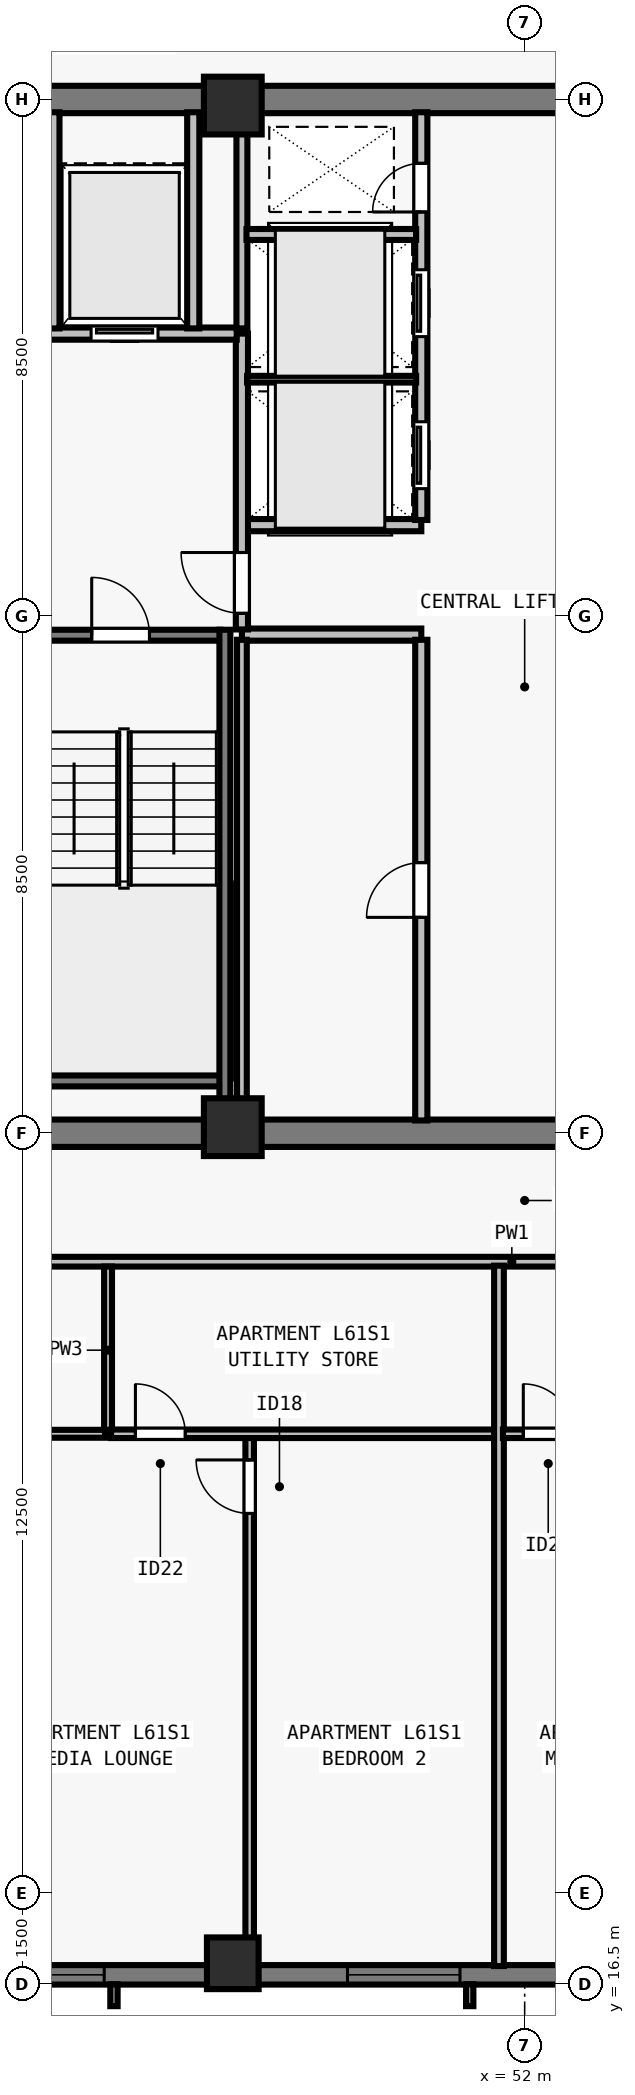
"""IFC4 building model, lengths in metres.
Left out: names, types, materials, properties, quantities, classifications, styles, units other than length and angle.
Written with IfcOpenShell. Run it as: python <this file> out.ifc"""

import sys

from ifc_helpers import new_model, si_unit, direction, frame, frame_2d, origin, origin_2d, place, context, subcontext, project, spatial, rectangle, extrude, element, fill, save


model = new_model("IFC4")
c1 = context("Model", 3, precision=1e-05, world=origin(), true_north=direction((0.0, 1.0)))
c2 = subcontext(c1, "Body", "Model", "MODEL_VIEW")
j1 = project(units=[si_unit("LENGTHUNIT", "METRE"), si_unit("PLANEANGLEUNIT", "RADIAN")], contexts=[c1])
p1 = place(None, origin())
s1 = spatial("IfcSite", under=j1, at=p1, CompositionType="ELEMENT")
p2 = place(p1, origin())
s2 = spatial("IfcBuilding", under=s1, at=p2, CompositionType="ELEMENT")
p3 = place(p2, frame((0.0, 0.0, 223.5)))
s3 = spatial("IfcBuildingStorey", under=s2, at=p3, CompositionType="ELEMENT", Elevation=223.5)
for number, where, z_axis, x_axis in (
    (1, (47.2, 30.6, 0.0), (0.0, 0.0, 1.0), (1.0, 0.0, 0.0)),
    (2, (47.2, 47.4, 0.0), (0.0, 0.0, 1.0), (1.0, 0.0, 0.0)),
):
    element("IfcColumn", number, at=place(p3, frame(where, z_axis=z_axis, x_axis=x_axis)), inside=s3, PredefinedType="COLUMN", context=c2, shape_type="SweptSolid", body=[
        extrude(rectangle(XDim=0.95, YDim=0.95, at=origin_2d()), origin(), (0.0, 0.0, 1.0), 3.5),
    ])
p4 = place(p3, frame((47.2, 16.85, 0.0), z_axis=(0.0, 0.0, 1.0), x_axis=(1.0, 0.0, 0.0)))
e3 = element("IfcColumn", 3, at=p4, inside=s3, PredefinedType="COLUMN", context=c2, shape_type="SweptSolid", body=[
    extrude(rectangle(XDim=0.85, YDim=0.85, at=origin_2d()), origin(), (0.0, 0.0, 1.0), 3.5),
])
p5 = place(p3, frame((69.5, 16.66, 0.0), z_axis=(0.0, 0.0, 1.0), x_axis=(-1.0, 0.0, 0.0)))
e4 = element("IfcWall", 4, at=p5, inside=s3, PredefinedType="SOLIDWALL", context=c2, shape_type="SweptSolid", body=[
    extrude(rectangle(XDim=34.702, YDim=0.32, at=frame_2d((17.351, 0.0))), origin(), (0.0, 0.0, 1.0), 3.29),
])
p6 = place(p5, frame((5.863, 0.0, 0.8)))
e5 = element("IfcOpeningElement", 5, at=p6, cuts=e4, PredefinedType="OPENING", context=c2, shape_type="SweptSolid", body=[
    extrude(rectangle(XDim=1.85, YDim=1.678, at=frame_2d((0.925, 0.839))), frame((0.0, 0.17, 0.0), z_axis=(0.0, -1.0, 0.0), x_axis=(1.0, 0.0, 0.0)), (0.0, 0.0, 1.0), 0.34),
])
p7 = place(p5, frame((8.138, 0.0, 0.8)))
e6 = element("IfcOpeningElement", 6, at=p7, cuts=e4, PredefinedType="OPENING", context=c2, shape_type="SweptSolid", body=[
    extrude(rectangle(XDim=1.55, YDim=1.678, at=frame_2d((0.775, 0.839))), frame((0.0, 0.17, 0.0), z_axis=(0.0, -1.0, 0.0), x_axis=(1.0, 0.0, 0.0)), (0.0, 0.0, 1.0), 0.34),
])
p8 = place(p5, frame((10.113, 0.0, 0.8)))
e7 = element("IfcOpeningElement", 7, at=p8, cuts=e4, PredefinedType="OPENING", context=c2, shape_type="SweptSolid", body=[
    extrude(rectangle(XDim=1.85, YDim=1.678, at=frame_2d((0.925, 0.839))), frame((0.0, 0.17, 0.0), z_axis=(0.0, -1.0, 0.0), x_axis=(1.0, 0.0, 0.0)), (0.0, 0.0, 1.0), 0.34),
])
p9 = place(p5, frame((14.888, 0.0, 0.8)))
e8 = element("IfcOpeningElement", 8, at=p9, cuts=e4, PredefinedType="OPENING", context=c2, shape_type="SweptSolid", body=[
    extrude(rectangle(XDim=1.55, YDim=1.678, at=frame_2d((0.775, 0.839))), frame((0.0, 0.17, 0.0), z_axis=(0.0, -1.0, 0.0), x_axis=(1.0, 0.0, 0.0)), (0.0, 0.0, 1.0), 0.34),
])
p10 = place(p5, frame((18.564, 0.0, 0.8)))
e9 = element("IfcOpeningElement", 9, at=p10, cuts=e4, PredefinedType="OPENING", context=c2, shape_type="SweptSolid", body=[
    extrude(rectangle(XDim=1.85, YDim=1.678, at=frame_2d((0.925, 0.839))), frame((0.0, 0.17, 0.0), z_axis=(0.0, -1.0, 0.0), x_axis=(1.0, 0.0, 0.0)), (0.0, 0.0, 1.0), 0.34),
])
p11 = place(p5, frame((24.414, 0.0, 0.8)))
e10 = element("IfcOpeningElement", 10, at=p11, cuts=e4, PredefinedType="OPENING", context=c2, shape_type="SweptSolid", body=[
    extrude(rectangle(XDim=1.85, YDim=1.678, at=frame_2d((0.925, 0.839))), frame((0.0, 0.17, 0.0), z_axis=(0.0, -1.0, 0.0), x_axis=(1.0, 0.0, 0.0)), (0.0, 0.0, 1.0), 0.34),
])
p12 = place(p5, frame((28.389, 0.0, 0.8)))
e11 = element("IfcOpeningElement", 11, at=p12, cuts=e4, PredefinedType="OPENING", context=c2, shape_type="SweptSolid", body=[
    extrude(rectangle(XDim=1.55, YDim=1.678, at=frame_2d((0.775, 0.839))), frame((0.0, 0.17, 0.0), z_axis=(0.0, -1.0, 0.0), x_axis=(1.0, 0.0, 0.0)), (0.0, 0.0, 1.0), 0.34),
])
for number, where, z_axis, x_axis in (
    (12, (43.275, 30.5, 0.0), (0.0, 0.0, 1.0), (1.0, 0.0, 0.0)),
    (13, (43.275, 47.5, 0.0), (0.0, 0.0, 1.0), (1.0, 0.0, 0.0)),
):
    element("IfcWall", number, at=place(p3, frame(where, z_axis=z_axis, x_axis=x_axis)), inside=s3, PredefinedType="SHEAR", context=c2, shape_type="SweptSolid", body=[
        extrude(rectangle(XDim=17.45, YDim=0.45, at=frame_2d((8.725, 0.0))), origin(), (0.0, 0.0, 1.0), 3.29),
    ])
for number, where, z_axis, x_axis in (
    (14, (47.35, 38.7, 0.0), (0.0, 0.0, 1.0), (1.0, 0.0, 0.0)),
    (15, (47.35, 40.5, 0.0), (0.0, 0.0, 1.0), (1.0, 0.0, 0.0)),
):
    element("IfcWall", number, at=place(p3, frame(where, z_axis=z_axis, x_axis=x_axis)), inside=s3, PredefinedType="SOLIDWALL", context=c2, shape_type="SweptSolid", body=[
        extrude(rectangle(XDim=2.95, YDim=0.2, at=frame_2d((1.475, 0.0))), origin(), (0.0, 0.0, 1.0), 3.29),
    ])
p13 = place(p3, frame((50.3, 30.71, 0.0), z_axis=(0.0, 0.0, 1.0), x_axis=(0.0, 1.0, 0.0)))
e16 = element("IfcWall", 16, at=p13, inside=s3, PredefinedType="SOLIDWALL", context=c2, shape_type="SweptSolid", body=[
    extrude(rectangle(XDim=7.905, YDim=0.2, at=frame_2d((3.953, 0.0))), origin(), (0.0, 0.0, 1.0), 3.29),
])
p14 = place(p13, frame((3.34, 0.0, 0.0)))
e17 = element("IfcOpeningElement", 17, at=p14, cuts=e16, PredefinedType="OPENING", context=c2, shape_type="SweptSolid", body=[
    extrude(rectangle(XDim=0.9, YDim=2.12, at=frame_2d((0.45, 1.06))), frame((0.0, 0.11, 0.0), z_axis=(0.0, -1.0, 0.0), x_axis=(1.0, 0.0, 0.0)), (0.0, 0.0, 1.0), 0.22),
])
p15 = place(p3, frame((50.3, 40.585, 0.0), z_axis=(0.0, 0.0, 1.0), x_axis=(0.0, 1.0, 0.0)))
e18 = element("IfcWall", 18, at=p15, inside=s3, PredefinedType="SOLIDWALL", context=c2, shape_type="SweptSolid", body=[
    extrude(rectangle(XDim=6.705, YDim=0.2, at=frame_2d((3.353, 0.0))), origin(), (0.0, 0.0, 1.0), 3.29),
])
p16 = place(p15, frame((0.515, 0.0, 0.0)))
e19 = element("IfcOpeningElement", 19, at=p16, cuts=e18, PredefinedType="OPENING", context=c2, shape_type="SweptSolid", body=[
    extrude(rectangle(XDim=1.1, YDim=2.2, at=frame_2d((0.55, 1.1))), frame((0.0, 0.11, 0.0), z_axis=(0.0, -1.0, 0.0), x_axis=(1.0, 0.0, 0.0)), (0.0, 0.0, 1.0), 0.22),
])
p17 = place(p15, frame((3.015, 0.0, 0.0)))
e20 = element("IfcOpeningElement", 20, at=p17, cuts=e18, PredefinedType="OPENING", context=c2, shape_type="SweptSolid", body=[
    extrude(rectangle(XDim=1.1, YDim=2.2, at=frame_2d((0.55, 1.1))), frame((0.0, 0.11, 0.0), z_axis=(0.0, -1.0, 0.0), x_axis=(1.0, 0.0, 0.0)), (0.0, 0.0, 1.0), 0.22),
])
p18 = place(p15, frame((5.065, 0.0, 0.0)))
e21 = element("IfcOpeningElement", 21, at=p18, cuts=e18, PredefinedType="OPENING", context=c2, shape_type="SweptSolid", body=[
    extrude(rectangle(XDim=0.8, YDim=2.08, at=frame_2d((0.4, 1.04))), frame((0.0, 0.11, 0.0), z_axis=(0.0, -1.0, 0.0), x_axis=(1.0, 0.0, 0.0)), (0.0, 0.0, 1.0), 0.22),
])
p19 = place(p3, frame((47.35, 38.785, 0.0), z_axis=(0.0, 0.0, 1.0), x_axis=(0.0, 1.0, 0.0)))
e22 = element("IfcWall", 22, at=p19, inside=s3, PredefinedType="SOLIDWALL", context=c2, shape_type="SweptSolid", body=[
    extrude(rectangle(XDim=4.865, YDim=0.2, at=frame_2d((2.433, 0.0))), origin(), (0.0, 0.0, 1.0), 3.29),
])
p20 = place(p19, frame((0.265, 0.0, 0.0)))
e23 = element("IfcOpeningElement", 23, at=p20, cuts=e22, PredefinedType="OPENING", context=c2, shape_type="SweptSolid", body=[
    extrude(rectangle(XDim=1.0, YDim=2.15, at=frame_2d((0.5, 1.075))), frame((0.0, 0.11, 0.0), z_axis=(0.0, -1.0, 0.0), x_axis=(1.0, 0.0, 0.0)), (0.0, 0.0, 1.0), 0.22),
])
p21 = place(p3, frame((43.71, 43.65, 0.0), z_axis=(0.0, 0.0, 1.0), x_axis=(1.0, 0.0, 0.0)))
e24 = element("IfcWall", 24, at=p21, inside=s3, PredefinedType="SOLIDWALL", context=c2, shape_type="SweptSolid", body=[
    extrude(rectangle(XDim=3.555, YDim=0.2, at=frame_2d((1.777, 0.0))), origin(), (0.0, 0.0, 1.0), 3.29),
])
p22 = place(p21, frame((1.16, 0.0, 0.0)))
e25 = element("IfcOpeningElement", 25, at=p22, cuts=e24, PredefinedType="OPENING", context=c2, shape_type="SweptSolid", body=[
    extrude(rectangle(XDim=1.1, YDim=2.2, at=frame_2d((0.55, 1.1))), frame((0.0, 0.11, 0.0), z_axis=(0.0, -1.0, 0.0), x_axis=(1.0, 0.0, 0.0)), (0.0, 0.0, 1.0), 0.22),
])
for number, where, z_axis, x_axis in (
    (26, (46.55, 43.735, 0.0), (0.0, 0.0, 1.0), (0.0, 1.0, 0.0)),
    (27, (44.25, 43.735, 0.0), (0.0, 0.0, 1.0), (0.0, 1.0, 0.0)),
):
    element("IfcWall", number, at=place(p3, frame(where, z_axis=z_axis, x_axis=x_axis)), inside=s3, PredefinedType="SOLIDWALL", context=c2, shape_type="SweptSolid", body=[
        extrude(rectangle(XDim=3.555, YDim=0.2, at=frame_2d((1.777, 0.0))), origin(), (0.0, 0.0, 1.0), 3.29),
    ])
p23 = place(p3, frame((47.35, 30.71, 0.0), z_axis=(0.0, 0.0, 1.0), x_axis=(0.0, 1.0, 0.0)))
e28 = element("IfcWall", 28, at=p23, inside=s3, PredefinedType="PARTITIONING", context=c2, shape_type="SweptSolid", body=[
    extrude(rectangle(XDim=7.905, YDim=0.16, at=frame_2d((3.953, 0.0))), origin(), (0.0, 0.0, 1.0), 3.29),
])
p24 = place(p3, frame((47.35, 43.735, 0.0), z_axis=(0.0, 0.0, 1.0), x_axis=(0.0, 1.0, 0.0)))
e29 = element("IfcWall", 29, at=p24, inside=s3, PredefinedType="SOLIDWALL", context=c2, shape_type="SweptSolid", body=[
    extrude(rectangle(XDim=3.555, YDim=0.18, at=frame_2d((1.777, 0.0))), origin(), (0.0, 0.0, 1.0), 3.29),
])
p25 = place(p3, frame((47.435, 42.9, 0.0), z_axis=(0.0, 0.0, 1.0), x_axis=(1.0, 0.0, 0.0)))
e30 = element("IfcWall", 30, at=p25, inside=s3, PredefinedType="PARTITIONING", context=c2, shape_type="SweptSolid", body=[
    extrude(rectangle(XDim=2.78, YDim=0.11, at=frame_2d((1.39, 0.0))), origin(), (0.0, 0.0, 1.0), 3.29),
])
p26 = place(p3, frame((47.425, 45.28, 0.0), z_axis=(0.0, 0.0, 1.0), x_axis=(1.0, 0.0, 0.0)))
e31 = element("IfcWall", 31, at=p26, inside=s3, PredefinedType="SOLIDWALL", context=c2, shape_type="SweptSolid", body=[
    extrude(rectangle(XDim=2.79, YDim=0.18, at=frame_2d((1.395, 0.0))), origin(), (0.0, 0.0, 1.0), 3.29),
])
p27 = place(p3, frame((29.805, 28.387, 0.0), z_axis=(0.0, 0.0, 1.0), x_axis=(1.0, 0.0, 0.0)))
e32 = element("IfcWall", 32, at=p27, inside=s3, PredefinedType="PARTITIONING", context=c2, shape_type="SweptSolid", body=[
    extrude(rectangle(XDim=44.39, YDim=0.16, at=frame_2d((22.195, 0.0))), origin(), (0.0, 0.0, 1.0), 2.958),
])
p28 = place(p27, frame((10.464, 0.0, 0.0)))
e33 = element("IfcOpeningElement", 33, at=p28, cuts=e32, PredefinedType="OPENING", context=c2, shape_type="SweptSolid", body=[
    extrude(rectangle(XDim=0.96, YDim=2.18, at=frame_2d((0.48, 1.09))), frame((0.0, 0.09, 0.0), z_axis=(0.0, -1.0, 0.0), x_axis=(1.0, 0.0, 0.0)), (0.0, 0.0, 1.0), 0.18),
])
p29 = place(p27, frame((32.544, 0.0, 0.0)))
e34 = element("IfcOpeningElement", 34, at=p29, cuts=e32, PredefinedType="OPENING", context=c2, shape_type="SweptSolid", body=[
    extrude(rectangle(XDim=0.96, YDim=2.18, at=frame_2d((0.48, 1.09))), frame((0.0, 0.09, 0.0), z_axis=(0.0, -1.0, 0.0), x_axis=(1.0, 0.0, 0.0)), (0.0, 0.0, 1.0), 0.18),
])
p30 = place(p3, frame((45.149, 25.558, 0.0), z_axis=(0.0, 0.0, 1.0), x_axis=(0.0, 1.0, 0.0)))
e35 = element("IfcWall", 35, at=p30, inside=s3, PredefinedType="PLUMBINGWALL", context=c2, shape_type="SweptSolid", body=[
    extrude(rectangle(XDim=2.75, YDim=0.13, at=frame_2d((1.375, 0.0))), origin(), (0.0, 0.0, 1.0), 3.29),
])
p31 = place(p3, frame((41.949, 25.558, 0.0), z_axis=(0.0, 0.0, 1.0), x_axis=(1.0, 0.0, 0.0)))
e36 = element("IfcWall", 36, at=p31, inside=s3, PredefinedType="PLUMBINGWALL", context=c2, shape_type="SweptSolid", body=[
    extrude(rectangle(XDim=3.15, YDim=0.13, at=frame_2d((1.575, 0.0))), origin(), (0.0, 0.0, 1.0), 3.29),
])
p32 = place(p3, frame((47.478, 16.88, 0.0), z_axis=(0.0, 0.0, 1.0), x_axis=(0.0, 1.0, 0.0)))
e37 = element("IfcWall", 37, at=p32, inside=s3, PredefinedType="PARTITIONING", context=c2, shape_type="SweptSolid", body=[
    extrude(rectangle(XDim=8.718, YDim=0.14, at=frame_2d((4.359, 0.0))), origin(), (0.0, 0.0, 1.0), 2.958),
])
p33 = place(p32, frame((7.367, 0.0, 0.0)))
e38 = element("IfcOpeningElement", 38, at=p33, cuts=e37, PredefinedType="OPENING", context=c2, shape_type="SweptSolid", body=[
    extrude(rectangle(XDim=0.88, YDim=2.1, at=frame_2d((0.44, 1.05))), frame((0.0, 0.08, 0.0), z_axis=(0.0, -1.0, 0.0), x_axis=(1.0, 0.0, 0.0)), (0.0, 0.0, 1.0), 0.16),
])
p34 = place(p3, frame((45.199, 25.558, 0.0), z_axis=(0.0, 0.0, 1.0), x_axis=(1.0, 0.0, 0.0)))
e39 = element("IfcWall", 39, at=p34, inside=s3, PredefinedType="PARTITIONING", context=c2, shape_type="SweptSolid", body=[
    extrude(rectangle(XDim=6.429, YDim=0.14, at=frame_2d((3.214, 0.0))), origin(), (0.0, 0.0, 1.0), 3.29),
])
p35 = place(p34, frame((0.4, 0.0, 0.0)))
e40 = element("IfcOpeningElement", 40, at=p35, cuts=e39, PredefinedType="OPENING", context=c2, shape_type="SweptSolid", body=[
    extrude(rectangle(XDim=0.82, YDim=2.1, at=frame_2d((0.41, 1.05))), frame((0.0, 0.08, 0.0), z_axis=(0.0, -1.0, 0.0), x_axis=(1.0, 0.0, 0.0)), (0.0, 0.0, 1.0), 0.16),
])
p36 = place(p3, frame((51.577, 16.805, 0.0), z_axis=(0.0, 0.0, 1.0), x_axis=(0.0, 1.0, 0.0)))
e41 = element("IfcWall", 41, at=p36, inside=s3, PredefinedType="PARTITIONING", context=c2, shape_type="SweptSolid", body=[
    extrude(rectangle(XDim=11.518, YDim=0.16, at=frame_2d((5.759, 0.0))), origin(), (0.0, 0.0, 1.0), 2.958),
])
p37 = place(p3, frame((51.643, 25.558, 0.0), z_axis=(0.0, 0.0, 1.0), x_axis=(1.0, 0.0, 0.0)))
e42 = element("IfcWall", 42, at=p37, inside=s3, PredefinedType="PARTITIONING", context=c2, shape_type="SweptSolid", body=[
    extrude(rectangle(XDim=7.036, YDim=0.14, at=frame_2d((3.518, 0.0))), origin(), (0.0, 0.0, 1.0), 3.29),
])
p38 = place(p37, frame((0.335, 0.0, 0.0)))
e43 = element("IfcOpeningElement", 43, at=p38, cuts=e42, PredefinedType="OPENING", context=c2, shape_type="SweptSolid", body=[
    extrude(rectangle(XDim=0.82, YDim=2.1, at=frame_2d((0.41, 1.05))), frame((0.0, 0.08, 0.0), z_axis=(0.0, -1.0, 0.0), x_axis=(1.0, 0.0, 0.0)), (0.0, 0.0, 1.0), 0.16),
])
p39 = place(p3, frame((43.715, 38.69, 0.0), z_axis=(0.0, 0.0, 1.0), x_axis=(1.0, 0.0, 0.0)))
e44 = element("IfcWall", 44, at=p39, inside=s3, PredefinedType="SOLIDWALL", context=c2, shape_type="SweptSolid", body=[
    extrude(rectangle(XDim=3.28, YDim=0.18, at=frame_2d((1.64, 0.0))), origin(), (0.0, 0.0, 1.0), 3.29),
])
p40 = place(p39, frame((1.165, 0.0, 0.0)))
e45 = element("IfcOpeningElement", 45, at=p40, cuts=e44, PredefinedType="OPENING", context=c2, shape_type="SweptSolid", body=[
    extrude(rectangle(XDim=0.95, YDim=2.15, at=frame_2d((0.475, 1.075))), frame((0.0, 0.1, 0.0), z_axis=(0.0, -1.0, 0.0), x_axis=(1.0, 0.0, 0.0)), (0.0, 0.0, 1.0), 0.2),
])
p41 = place(p3, frame((43.715, 31.36, 0.0), z_axis=(0.0, 0.0, 1.0), x_axis=(1.0, 0.0, 0.0)))
e46 = element("IfcWall", 46, at=p41, inside=s3, PredefinedType="SOLIDWALL", context=c2, shape_type="SweptSolid", body=[
    extrude(rectangle(XDim=3.28, YDim=0.18, at=frame_2d((1.64, 0.0))), origin(), (0.0, 0.0, 1.0), 3.29),
])
p42 = place(p3, frame((47.07, 38.78, 0.0), z_axis=(0.0, 0.0, 1.0), x_axis=(0.0, -1.0, 0.0)))
e47 = element("IfcWall", 47, at=p42, inside=s3, PredefinedType="SOLIDWALL", context=c2, shape_type="SweptSolid", body=[
    extrude(rectangle(XDim=8.067, YDim=0.18, at=frame_2d((4.034, 0.0))), origin(), (0.0, 0.0, 1.0), 3.29),
])
p43 = place(p10, origin())
e48 = element("IfcWindow", 48, at=p43, inside=s3, PartitioningType="SINGLE_PANEL", PredefinedType="WINDOW", context=c2, shape_type="SweptSolid", body=[
    extrude(rectangle(XDim=1.85, YDim=1.678, at=frame_2d((0.925, 0.839))), frame((0.0, -0.05, 0.0), z_axis=(0.0, -1.0, 0.0), x_axis=(1.0, 0.0, 0.0)), (0.0, 0.0, 1.0), 0.06),
])
fill(e9, e48)
p44 = place(p11, origin())
e49 = element("IfcWindow", 49, at=p44, inside=s3, PartitioningType="SINGLE_PANEL", PredefinedType="WINDOW", context=c2, shape_type="SweptSolid", body=[
    extrude(rectangle(XDim=1.85, YDim=1.678, at=frame_2d((0.925, 0.839))), frame((0.0, -0.05, 0.0), z_axis=(0.0, -1.0, 0.0), x_axis=(1.0, 0.0, 0.0)), (0.0, 0.0, 1.0), 0.06),
])
fill(e10, e49)
p45 = place(p20, origin())
e50 = element("IfcDoor", 50, at=p45, inside=s3, OperationType="SINGLE_SWING_RIGHT", PredefinedType="DOOR", context=c2, shape_type="SweptSolid", body=[
    extrude(rectangle(XDim=1.0, YDim=2.15, at=frame_2d((0.5, 1.075))), frame((0.0, 0.025, 0.0), z_axis=(0.0, -1.0, 0.0), x_axis=(1.0, 0.0, 0.0)), (0.0, 0.0, 1.0), 0.05),
])
fill(e23, e50)
p46 = place(p22, origin())
e51 = element("IfcDoor", 51, at=p46, inside=s3, OperationType="SLIDING_TO_LEFT", PredefinedType="DOOR", context=c2, shape_type="SweptSolid", body=[
    extrude(rectangle(XDim=1.1, YDim=2.2, at=frame_2d((0.55, 1.1))), frame((0.0, 0.025, 0.0), z_axis=(0.0, -1.0, 0.0), x_axis=(1.0, 0.0, 0.0)), (0.0, 0.0, 1.0), 0.05),
])
fill(e25, e51)
p47 = place(p14, origin())
e52 = element("IfcDoor", 52, at=p47, inside=s3, OperationType="SINGLE_SWING_LEFT", PredefinedType="DOOR", context=c2, shape_type="SweptSolid", body=[
    extrude(rectangle(XDim=0.9, YDim=2.12, at=frame_2d((0.45, 1.06))), frame((0.0, 0.025, 0.0), z_axis=(0.0, -1.0, 0.0), x_axis=(1.0, 0.0, 0.0)), (0.0, 0.0, 1.0), 0.05),
])
fill(e17, e52)
p48 = place(p16, origin())
e53 = element("IfcDoor", 53, at=p48, inside=s3, OperationType="SLIDING_TO_LEFT", PredefinedType="DOOR", context=c2, shape_type="SweptSolid", body=[
    extrude(rectangle(XDim=1.1, YDim=2.2, at=frame_2d((0.55, 1.1))), frame((0.0, 0.025, 0.0), z_axis=(0.0, -1.0, 0.0), x_axis=(1.0, 0.0, 0.0)), (0.0, 0.0, 1.0), 0.05),
])
fill(e19, e53)
p49 = place(p17, origin())
e54 = element("IfcDoor", 54, at=p49, inside=s3, OperationType="SLIDING_TO_LEFT", PredefinedType="DOOR", context=c2, shape_type="SweptSolid", body=[
    extrude(rectangle(XDim=1.1, YDim=2.2, at=frame_2d((0.55, 1.1))), frame((0.0, 0.025, 0.0), z_axis=(0.0, -1.0, 0.0), x_axis=(1.0, 0.0, 0.0)), (0.0, 0.0, 1.0), 0.05),
])
fill(e20, e54)
p50 = place(p18, origin())
e55 = element("IfcDoor", 55, at=p50, inside=s3, OperationType="SINGLE_SWING_LEFT", PredefinedType="DOOR", context=c2, shape_type="SweptSolid", body=[
    extrude(rectangle(XDim=0.8, YDim=2.08, at=frame_2d((0.4, 1.04))), frame((0.0, 0.025, 0.0), z_axis=(0.0, -1.0, 0.0), x_axis=(1.0, 0.0, 0.0)), (0.0, 0.0, 1.0), 0.05),
])
fill(e21, e55)
p51 = place(p35, origin())
e56 = element("IfcDoor", 56, at=p51, inside=s3, OperationType="SINGLE_SWING_LEFT", PredefinedType="DOOR", context=c2, shape_type="SweptSolid", body=[
    extrude(rectangle(XDim=0.82, YDim=2.1, at=frame_2d((0.41, 1.05))), frame((0.0, 0.025, 0.0), z_axis=(0.0, -1.0, 0.0), x_axis=(1.0, 0.0, 0.0)), (0.0, 0.0, 1.0), 0.05),
])
fill(e40, e56)
p52 = place(p33, origin())
e57 = element("IfcDoor", 57, at=p52, inside=s3, OperationType="SINGLE_SWING_RIGHT", PredefinedType="DOOR", context=c2, shape_type="SweptSolid", body=[
    extrude(rectangle(XDim=0.88, YDim=2.1, at=frame_2d((0.44, 1.05))), frame((0.0, 0.025, 0.0), z_axis=(0.0, -1.0, 0.0), x_axis=(1.0, 0.0, 0.0)), (0.0, 0.0, 1.0), 0.05),
])
fill(e38, e57)
p53 = place(p38, origin())
e58 = element("IfcDoor", 58, at=p53, inside=s3, OperationType="SINGLE_SWING_LEFT", PredefinedType="DOOR", context=c2, shape_type="SweptSolid", body=[
    extrude(rectangle(XDim=0.82, YDim=2.1, at=frame_2d((0.41, 1.05))), frame((0.0, 0.025, 0.0), z_axis=(0.0, -1.0, 0.0), x_axis=(1.0, 0.0, 0.0)), (0.0, 0.0, 1.0), 0.05),
])
fill(e43, e58)
p54 = place(p40, origin())
e59 = element("IfcDoor", 59, at=p54, inside=s3, OperationType="SINGLE_SWING_LEFT", PredefinedType="DOOR", context=c2, shape_type="SweptSolid", body=[
    extrude(rectangle(XDim=0.95, YDim=2.15, at=frame_2d((0.475, 1.075))), frame((0.0, 0.025, 0.0), z_axis=(0.0, -1.0, 0.0), x_axis=(1.0, 0.0, 0.0)), (0.0, 0.0, 1.0), 0.05),
])
fill(e45, e59)
save(model, sys.argv[1])
